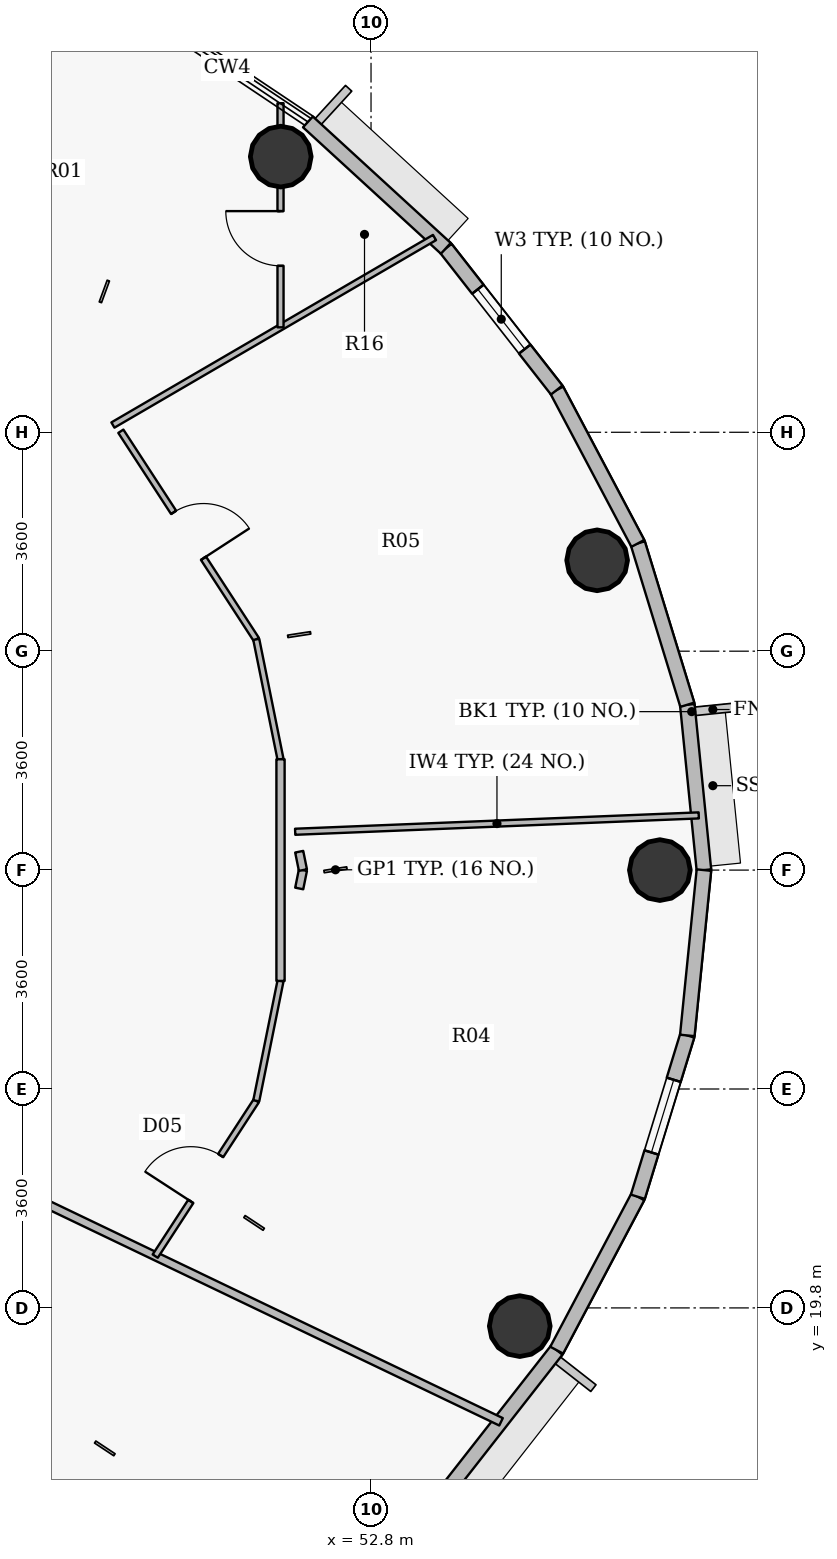
"""IFC4 building model, lengths in metres.
Left out: names, types, materials, properties, quantities, classifications, styles, units other than length and angle.
Written with IfcOpenShell. Run it as: python <this file> out.ifc"""

import sys

from ifc_helpers import new_model, si_unit, direction, frame, frame_2d, origin, origin_2d, place, context, subcontext, project, spatial, rectangle, hollow_circle, extrude, source, transform, mapped, element, fill, save


model = new_model("IFC4")
c1 = context("Model", 3, precision=1e-05, world=origin(), true_north=direction((0.0, 1.0)))
c2 = subcontext(c1, "Body", "Model", "MODEL_VIEW")
j1 = project(units=[si_unit("LENGTHUNIT", "METRE"), si_unit("PLANEANGLEUNIT", "RADIAN")], contexts=[c1])
p1 = place(None, origin())
s1 = spatial("IfcSite", under=j1, at=p1, CompositionType="ELEMENT")
p2 = place(p1, origin())
s2 = spatial("IfcBuilding", under=s1, at=p2, CompositionType="ELEMENT")
p3 = place(p2, frame((0.0, 0.0, 306.75)))
s3 = spatial("IfcBuildingStorey", under=s2, at=p3, CompositionType="ELEMENT", Elevation=306.75)
for number, where, z_axis, x_axis in (
    (1, (57.55, 27.0, 0.0), (0.0, 0.0, 1.0), (1.0, 0.0, 0.0)),
    (2, (56.519, 32.094, 0.0), (0.0, 0.0, 1.0), (1.0, 0.0, 0.0)),
    (3, (51.315, 38.733, 0.0), (0.0, 0.0, 1.0), (1.0, 0.0, 0.0)),
    (4, (55.246, 19.5, 0.0), (0.0, 0.0, 1.0), (1.0, 0.0, 0.0)),
):
    element("IfcColumn", number, at=place(p3, frame(where, z_axis=z_axis, x_axis=x_axis)), inside=s3, PredefinedType="COLUMN", context=c2, shape_type="SweptSolid", body=[
        extrude(hollow_circle(Radius=0.5, WallThickness=0.032, at=origin_2d()), origin(), (0.0, 0.0, 1.0), 3.75),
    ])
p4 = place(p3, frame((58.002, 29.719, 0.0), z_axis=(0.0, 0.0, 1.0), x_axis=(0.099972526841, -0.99499019788, 0.0)))
e5 = element("IfcWall", 5, at=p4, inside=s3, PredefinedType="SOLIDWALL", context=c2, shape_type="SweptSolid", body=[
    extrude(rectangle(XDim=2.733, YDim=0.24, at=frame_2d((1.366, 0.0))), origin(), (0.0, 0.0, 1.0), 3.5),
])
p5 = place(p3, frame((57.188, 32.372, 0.0), z_axis=(0.0, 0.0, 1.0), x_axis=(0.2931213403, -0.956075248012, 0.0)))
e6 = element("IfcWall", 6, at=p5, inside=s3, PredefinedType="SOLIDWALL", context=c2, shape_type="SweptSolid", body=[
    extrude(rectangle(XDim=2.775, YDim=0.24, at=frame_2d((1.388, 0.0))), origin(), (0.0, 0.0, 1.0), 3.5),
])
p6 = place(p3, frame((55.854, 34.895, 0.0), z_axis=(0.0, 0.0, 1.0), x_axis=(0.467628269026, -0.883925224218, 0.0)))
e7 = element("IfcWall", 7, at=p6, inside=s3, PredefinedType="SOLIDWALL", context=c2, shape_type="SweptSolid", body=[
    extrude(rectangle(XDim=2.854, YDim=0.24, at=frame_2d((1.427, 0.0))), origin(), (0.0, 0.0, 1.0), 3.5),
])
p7 = place(p3, frame((54.03, 37.225, 0.0), z_axis=(0.0, 0.0, 1.0), x_axis=(0.616337186556, -0.787482363275, 0.0)))
e8 = element("IfcWall", 8, at=p7, inside=s3, PredefinedType="SOLIDWALL", context=c2, shape_type="SweptSolid", body=[
    extrude(rectangle(XDim=2.958, YDim=0.24, at=frame_2d((1.479, 0.0))), origin(), (0.0, 0.0, 1.0), 3.5),
])
p8 = place(p7, frame((0.854, 0.0, 0.9)))
e9 = element("IfcOpeningElement", 9, at=p8, cuts=e8, PredefinedType="OPENING", context=c2, shape_type="SweptSolid", body=[
    extrude(rectangle(XDim=1.25, YDim=1.65, at=origin_2d()), frame((0.625, 0.13, 0.825), z_axis=(0.0, -1.0, 0.0), x_axis=(1.0, 0.0, 0.0)), (0.0, 0.0, 1.0), 0.26),
])
p9 = place(p3, frame((51.762, 39.304, 0.0), z_axis=(0.0, 0.0, 1.0), x_axis=(0.737068506972, -0.675818034703, 0.0)))
e10 = element("IfcWall", 10, at=p9, inside=s3, PredefinedType="SOLIDWALL", context=c2, shape_type="SweptSolid", body=[
    extrude(rectangle(XDim=3.077, YDim=0.24, at=frame_2d((1.539, 0.0))), origin(), (0.0, 0.0, 1.0), 3.5),
])
p10 = place(p3, frame((55.854, 19.105, 0.0), z_axis=(0.0, 0.0, 1.0), x_axis=(-0.616337186556, -0.787482363275, 0.0)))
e11 = element("IfcWall", 11, at=p10, inside=s3, PredefinedType="SOLIDWALL", context=c2, shape_type="SweptSolid", body=[
    extrude(rectangle(XDim=2.958, YDim=0.24, at=frame_2d((1.479, 0.0))), origin(), (0.0, 0.0, 1.0), 3.5),
])
p11 = place(p3, frame((57.188, 21.628, 0.0), z_axis=(0.0, 0.0, 1.0), x_axis=(-0.467628269026, -0.883925224218, 0.0)))
e12 = element("IfcWall", 12, at=p11, inside=s3, PredefinedType="SOLIDWALL", context=c2, shape_type="SweptSolid", body=[
    extrude(rectangle(XDim=2.854, YDim=0.24, at=frame_2d((1.427, 0.0))), origin(), (0.0, 0.0, 1.0), 3.5),
])
p12 = place(p3, frame((58.002, 24.281, 0.0), z_axis=(0.0, 0.0, 1.0), x_axis=(-0.2931213403, -0.956075248012, 0.0)))
e13 = element("IfcWall", 13, at=p12, inside=s3, PredefinedType="SOLIDWALL", context=c2, shape_type="SweptSolid", body=[
    extrude(rectangle(XDim=2.775, YDim=0.24, at=frame_2d((1.388, 0.0))), origin(), (0.0, 0.0, 1.0), 3.5),
])
p13 = place(p12, frame((0.763, 0.0, 0.9)))
e14 = element("IfcOpeningElement", 14, at=p13, cuts=e13, PredefinedType="OPENING", context=c2, shape_type="SweptSolid", body=[
    extrude(rectangle(XDim=1.25, YDim=1.65, at=origin_2d()), frame((0.625, 0.13, 0.825), z_axis=(0.0, -1.0, 0.0), x_axis=(1.0, 0.0, 0.0)), (0.0, 0.0, 1.0), 0.26),
])
p14 = place(p3, frame((58.275, 27.0, 0.0), z_axis=(0.0, 0.0, 1.0), x_axis=(-0.099972526841, -0.99499019788, 0.0)))
e15 = element("IfcWall", 15, at=p14, inside=s3, PredefinedType="SOLIDWALL", context=c2, shape_type="SweptSolid", body=[
    extrude(rectangle(XDim=2.733, YDim=0.24, at=frame_2d((1.366, 0.0))), origin(), (0.0, 0.0, 1.0), 3.5),
])
p15 = place(p3, frame((47.05, 21.706, 0.0), z_axis=(0.0, 0.0, 1.0), x_axis=(0.901842087785, -0.432065792096, 0.0)))
e16 = element("IfcWall", 16, at=p15, inside=s3, PredefinedType="PARTITIONING", context=c2, shape_type="SweptSolid", body=[
    extrude(rectangle(XDim=8.747, YDim=0.135, at=frame_2d((4.373, 0.0))), origin(), (0.0, 0.0, 1.0), 2.985),
])
p16 = place(p3, frame((48.555, 34.319, 0.0), z_axis=(0.0, 0.0, 1.0), x_axis=(0.863923501635, 0.503623056783, 0.0)))
e17 = element("IfcWall", 17, at=p16, inside=s3, PredefinedType="PARTITIONING", context=c2, shape_type="SweptSolid", body=[
    extrude(rectangle(XDim=6.122, YDim=0.1, at=frame_2d((3.061, 0.0))), origin(), (0.0, 0.0, 1.0), 2.985),
])
p17 = place(p3, frame((48.685, 34.217, 0.0), z_axis=(0.0, 0.0, 1.0), x_axis=(0.545435886628, -0.838152547916, 0.0)))
e18 = element("IfcWall", 18, at=p17, inside=s3, PredefinedType="PARTITIONING", context=c2, shape_type="SweptSolid", body=[
    extrude(rectangle(XDim=4.083, YDim=0.1, at=frame_2d((2.042, 0.0))), origin(), (0.0, 0.0, 1.0), 3.035),
])
p18 = place(p17, frame((1.592, 0.0, 0.0)))
e19 = element("IfcOpeningElement", 19, at=p18, cuts=e18, PredefinedType="OPENING", context=c2, shape_type="SweptSolid", body=[
    extrude(rectangle(XDim=0.9, YDim=2.1, at=origin_2d()), frame((0.45, 0.06, 1.05), z_axis=(0.0, -1.0, 0.0), x_axis=(1.0, 0.0, 0.0)), (0.0, 0.0, 1.0), 0.12),
])
p19 = place(p3, frame((49.25, 20.652, 0.0), z_axis=(0.0, 0.0, 1.0), x_axis=(0.54545856642, 0.838137788385, 0.0)))
e20 = element("IfcWall", 20, at=p19, inside=s3, PredefinedType="PARTITIONING", context=c2, shape_type="SweptSolid", body=[
    extrude(rectangle(XDim=3.047, YDim=0.1, at=frame_2d((1.523, 0.0))), origin(), (0.0, 0.0, 1.0), 3.035),
])
p20 = place(p19, frame((1.073, 0.0, 0.0)))
e21 = element("IfcOpeningElement", 21, at=p20, cuts=e20, PredefinedType="OPENING", context=c2, shape_type="SweptSolid", body=[
    extrude(rectangle(XDim=0.9, YDim=2.1, at=origin_2d()), frame((0.45, 0.06, 1.05), z_axis=(0.0, -1.0, 0.0), x_axis=(1.0, 0.0, 0.0)), (0.0, 0.0, 1.0), 0.12),
])
p21 = place(p3, frame((50.913, 23.206, 0.0), z_axis=(0.0, 0.0, 1.0), x_axis=(0.198192944621, 0.980163025574, 0.0)))
e22 = element("IfcWall", 22, at=p21, inside=s3, PredefinedType="PARTITIONING", context=c2, shape_type="SweptSolid", body=[
    extrude(rectangle(XDim=2.011, YDim=0.1, at=frame_2d((1.006, 0.0))), origin(), (0.0, 0.0, 1.0), 3.5),
])
p22 = place(p3, frame((50.913, 30.794, 0.0), z_axis=(0.0, 0.0, 1.0), x_axis=(0.198192944621, -0.980163025574, 0.0)))
e23 = element("IfcWall", 23, at=p22, inside=s3, PredefinedType="PARTITIONING", context=c2, shape_type="SweptSolid", body=[
    extrude(rectangle(XDim=2.011, YDim=0.1, at=frame_2d((1.006, 0.0))), origin(), (0.0, 0.0, 1.0), 3.035),
])
p23 = place(p3, frame((51.311, 35.926, 0.0), z_axis=(0.0, 0.0, 1.0), x_axis=(0.0, 1.0, 0.0)))
e24 = element("IfcWall", 24, at=p23, inside=s3, PredefinedType="PARTITIONING", context=c2, shape_type="SweptSolid", body=[
    extrude(rectangle(XDim=3.686, YDim=0.1, at=frame_2d((1.843, 0.0))), origin(), (0.0, 0.0, 1.0), 3.5),
])
p24 = place(p23, frame((1.011, 0.0, 0.0)))
e25 = element("IfcOpeningElement", 25, at=p24, cuts=e24, PredefinedType="OPENING", context=c2, shape_type="SweptSolid", body=[
    extrude(rectangle(XDim=0.9, YDim=2.1, at=origin_2d()), frame((0.45, 0.06, 1.05), z_axis=(0.0, -1.0, 0.0), x_axis=(1.0, 0.0, 0.0)), (0.0, 0.0, 1.0), 0.12),
])
p25 = place(p3, frame((51.552, 27.63, 0.0), z_axis=(0.0, 0.0, 1.0), x_axis=(0.999179444864, 0.040502308109, 0.0)))
e26 = element("IfcWall", 26, at=p25, inside=s3, PredefinedType="PARTITIONING", context=c2, shape_type="SweptSolid", body=[
    extrude(rectangle(XDim=6.643, YDim=0.1, at=frame_2d((3.321, 0.0))), origin(), (0.0, 0.0, 1.0), 2.985),
])
p26 = place(p3, frame((51.311, 28.823, 0.0), z_axis=(0.0, 0.0, 1.0), x_axis=(0.0, -1.0, 0.0)))
e27 = element("IfcWall", 27, at=p26, inside=s3, PredefinedType="PARTITIONING", context=c2, shape_type="SweptSolid", body=[
    extrude(rectangle(XDim=3.645, YDim=0.135, at=frame_2d((1.823, 0.0))), origin(), (0.0, 0.0, 1.0), 3.035),
])
for number, where, z_axis, x_axis in (
    (28, (51.619, 26.698, 0.0), (0.0, 0.0, 1.0), (0.198, 0.98, 0.0)),
    (29, (51.68, 27.0, 0.0), (0.0, 0.0, 1.0), (-0.198, 0.98, 0.0)),
):
    element("IfcWall", number, at=place(p3, frame(where, z_axis=z_axis, x_axis=x_axis)), inside=s3, PredefinedType="PARTITIONING", context=c2, shape_type="SweptSolid", body=[
        extrude(rectangle(XDim=0.308, YDim=0.135, at=frame_2d((0.154, 0.0))), origin(), (0.0, 0.0, 1.0), 3.035),
    ])
m1 = source(origin(), c2, "Body", "SweptSolid", [
    extrude(rectangle(XDim=1.25, YDim=1.65, at=origin_2d()), frame((0.625, 0.03, 0.825), z_axis=(0.0, -1.0, 0.0), x_axis=(1.0, 0.0, 0.0)), (0.0, 0.0, 1.0), 0.06),
])
p27 = place(p8, origin())
e30 = element("IfcWindow", 30, at=p27, inside=s3, PartitioningType="SINGLE_PANEL", PredefinedType="WINDOW", context=c2, shape_type="MappedRepresentation", body=[
    mapped(m1, transform((0.0, 0.0, 0.0), x_axis=(1.0, 0.0, 0.0), y_axis=(0.0, 1.0, 0.0), z_axis=(0.0, 0.0, 1.0), scale=1.0)),
])
fill(e9, e30)
p28 = place(p13, origin())
e31 = element("IfcWindow", 31, at=p28, inside=s3, PartitioningType="SINGLE_PANEL", PredefinedType="WINDOW", context=c2, shape_type="MappedRepresentation", body=[
    mapped(m1, transform((0.0, 0.0, 0.0), x_axis=(1.0, 0.0, 0.0), y_axis=(0.0, 1.0, 0.0), z_axis=(0.0, 0.0, 1.0), scale=1.0)),
])
fill(e14, e31)
m2 = source(origin(), c2, "Body", "SweptSolid", [
    extrude(rectangle(XDim=0.9, YDim=2.1, at=origin_2d()), frame((0.45, 0.025, 1.05), z_axis=(0.0, -1.0, 0.0), x_axis=(1.0, 0.0, 0.0)), (0.0, 0.0, 1.0), 0.05),
])
p29 = place(p20, origin())
e32 = element("IfcDoor", 32, at=p29, inside=s3, OperationType="SINGLE_SWING_LEFT", PredefinedType="DOOR", context=c2, shape_type="MappedRepresentation", body=[
    mapped(m2, transform((0.0, 0.0, 0.0), x_axis=(1.0, 0.0, 0.0), y_axis=(0.0, 1.0, 0.0), z_axis=(0.0, 0.0, 1.0), scale=1.0)),
])
fill(e21, e32)
p30 = place(p18, origin())
e33 = element("IfcDoor", 33, at=p30, inside=s3, OperationType="SINGLE_SWING_RIGHT", PredefinedType="DOOR", context=c2, shape_type="MappedRepresentation", body=[
    mapped(m2, transform((0.0, 0.0, 0.0), x_axis=(1.0, 0.0, 0.0), y_axis=(0.0, 1.0, 0.0), z_axis=(0.0, 0.0, 1.0), scale=1.0)),
])
fill(e19, e33)
p31 = place(p24, origin())
e34 = element("IfcDoor", 34, at=p31, inside=s3, OperationType="SINGLE_SWING_RIGHT", PredefinedType="DOOR", context=c2, shape_type="MappedRepresentation", body=[
    mapped(m2, transform((0.0, 0.0, 0.0), x_axis=(1.0, 0.0, 0.0), y_axis=(0.0, 1.0, 0.0), z_axis=(0.0, 0.0, 1.0), scale=1.0)),
])
fill(e25, e34)
save(model, sys.argv[1])
